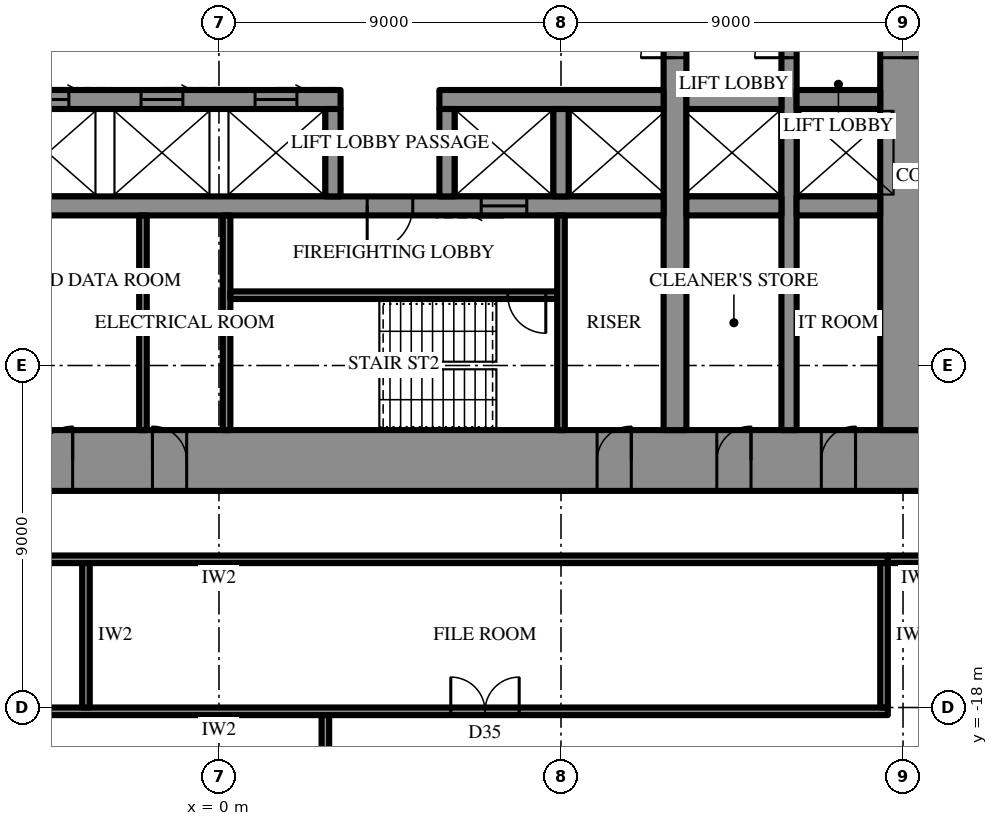
"""IFC4 building model, lengths in metres.
Left out: names, types, materials, properties, quantities, classifications, styles, units other than length and angle.
Written with IfcOpenShell. Run it as: python <this file> out.ifc"""

import sys

from ifc_helpers import new_model, si_unit, direction, frame, frame_2d, origin, place, context, subcontext, project, spatial, rectangle, extrude, element, fill, save


model = new_model("IFC4")
c1 = context("Model", 3, precision=1e-05, world=origin(), true_north=direction((0.0, 1.0)))
c2 = subcontext(c1, "Body", "Model", "MODEL_VIEW")
j1 = project(units=[si_unit("LENGTHUNIT", "METRE"), si_unit("PLANEANGLEUNIT", "RADIAN")], contexts=[c1])
p1 = place(None, origin())
s1 = spatial("IfcSite", under=j1, at=p1, CompositionType="ELEMENT")
p2 = place(p1, origin())
s2 = spatial("IfcBuilding", under=s1, at=p2, CompositionType="ELEMENT")
p3 = place(p2, frame((0.0, 0.0, 82.3)))
s3 = spatial("IfcBuildingStorey", under=s2, at=p3, CompositionType="ELEMENT", Elevation=82.3)
p4 = place(p3, frame((18.6, -11.5, 0.0), z_axis=(0.0, 0.0, 1.0), x_axis=(-1.0, 0.0, 0.0)))
e1 = element("IfcWall", 1, at=p4, inside=s3, PredefinedType="SHEAR", context=c2, shape_type="SweptSolid", body=[
    extrude(rectangle(XDim=37.2, YDim=1.6, at=frame_2d((18.6, 0.0))), origin(), (0.0, 0.0, 1.0), 4.2),
])
p5 = place(p4, frame((19.45, 0.0, 0.0)))
e2 = element("IfcOpeningElement", 2, at=p5, cuts=e1, PredefinedType="OPENING", context=c2, shape_type="SweptSolid", body=[
    extrude(rectangle(XDim=0.9, YDim=2.2, at=frame_2d((0.45, 1.1))), frame((0.0, 0.81, 0.0), z_axis=(0.0, -1.0, 0.0), x_axis=(1.0, 0.0, 0.0)), (0.0, 0.0, 1.0), 1.62),
])
p6 = place(p4, frame((22.45, 0.0, 0.0)))
e3 = element("IfcOpeningElement", 3, at=p6, cuts=e1, PredefinedType="OPENING", context=c2, shape_type="SweptSolid", body=[
    extrude(rectangle(XDim=0.9, YDim=2.2, at=frame_2d((0.45, 1.1))), frame((0.0, 0.81, 0.0), z_axis=(0.0, -1.0, 0.0), x_axis=(1.0, 0.0, 0.0)), (0.0, 0.0, 1.0), 1.62),
])
p7 = place(p4, frame((25.5, 0.0, 0.0)))
e4 = element("IfcOpeningElement", 4, at=p7, cuts=e1, PredefinedType="OPENING", context=c2, shape_type="SweptSolid", body=[
    extrude(rectangle(XDim=1.0, YDim=2.2, at=frame_2d((0.5, 1.1))), frame((0.0, 0.81, 0.0), z_axis=(0.0, -1.0, 0.0), x_axis=(1.0, 0.0, 0.0)), (0.0, 0.0, 1.0), 1.62),
])
p8 = place(p4, frame((1.85, 0.0, 0.0)))
e5 = element("IfcOpeningElement", 5, at=p8, cuts=e1, PredefinedType="OPENING", context=c2, shape_type="SweptSolid", body=[
    extrude(rectangle(XDim=0.9, YDim=2.2, at=frame_2d((0.45, 1.1))), frame((0.0, 0.81, 0.0), z_axis=(0.0, -1.0, 0.0), x_axis=(1.0, 0.0, 0.0)), (0.0, 0.0, 1.0), 1.62),
])
p9 = place(p4, frame((4.6, 0.0, 0.0)))
e6 = element("IfcOpeningElement", 6, at=p9, cuts=e1, PredefinedType="OPENING", context=c2, shape_type="SweptSolid", body=[
    extrude(rectangle(XDim=0.9, YDim=2.2, at=frame_2d((0.45, 1.1))), frame((0.0, 0.81, 0.0), z_axis=(0.0, -1.0, 0.0), x_axis=(1.0, 0.0, 0.0)), (0.0, 0.0, 1.0), 1.62),
])
p10 = place(p4, frame((7.75, 0.0, 0.0)))
e7 = element("IfcOpeningElement", 7, at=p10, cuts=e1, PredefinedType="OPENING", context=c2, shape_type="SweptSolid", body=[
    extrude(rectangle(XDim=0.9, YDim=2.2, at=frame_2d((0.45, 1.1))), frame((0.0, 0.81, 0.0), z_axis=(0.0, -1.0, 0.0), x_axis=(1.0, 0.0, 0.0)), (0.0, 0.0, 1.0), 1.62),
])
p11 = place(p4, frame((28.55, 0.0, 0.0)))
e8 = element("IfcOpeningElement", 8, at=p11, cuts=e1, PredefinedType="OPENING", context=c2, shape_type="SweptSolid", body=[
    extrude(rectangle(XDim=0.9, YDim=2.2, at=frame_2d((0.45, 1.1))), frame((0.0, 0.81, 0.0), z_axis=(0.0, -1.0, 0.0), x_axis=(1.0, 0.0, 0.0)), (0.0, 0.0, 1.0), 1.62),
])
p12 = place(p4, frame((31.7, 0.0, 0.0)))
e9 = element("IfcOpeningElement", 9, at=p12, cuts=e1, PredefinedType="OPENING", context=c2, shape_type="SweptSolid", body=[
    extrude(rectangle(XDim=0.9, YDim=2.2, at=frame_2d((0.45, 1.1))), frame((0.0, 0.81, 0.0), z_axis=(0.0, -1.0, 0.0), x_axis=(1.0, 0.0, 0.0)), (0.0, 0.0, 1.0), 1.62),
])
p13 = place(p4, frame((34.45, 0.0, 0.0)))
e10 = element("IfcOpeningElement", 10, at=p13, cuts=e1, PredefinedType="OPENING", context=c2, shape_type="SweptSolid", body=[
    extrude(rectangle(XDim=0.9, YDim=2.2, at=frame_2d((0.45, 1.1))), frame((0.0, 0.81, 0.0), z_axis=(0.0, -1.0, 0.0), x_axis=(1.0, 0.0, 0.0)), (0.0, 0.0, 1.0), 1.62),
])
p14 = place(p3, frame((18.0, -10.7, 0.0), z_axis=(0.0, 0.0, 1.0), x_axis=(0.0, 1.0, 0.0)))
e11 = element("IfcWall", 11, at=p14, inside=s3, PredefinedType="SHEAR", context=c2, shape_type="SweptSolid", body=[
    extrude(rectangle(XDim=21.4, YDim=1.2, at=frame_2d((10.7, 0.0))), origin(), (0.0, 0.0, 1.0), 4.2),
])
p15 = place(p14, frame((9.8, 0.0, 0.0)))
e12 = element("IfcOpeningElement", 12, at=p15, cuts=e11, PredefinedType="OPENING", context=c2, shape_type="SweptSolid", body=[
    extrude(rectangle(XDim=1.8, YDim=2.4, at=frame_2d((0.9, 1.2))), frame((0.0, 0.61, 0.0), z_axis=(0.0, -1.0, 0.0), x_axis=(1.0, 0.0, 0.0)), (0.0, 0.0, 1.0), 1.22),
])
p16 = place(p3, frame((12.0, -10.7, 0.0), z_axis=(0.0, 0.0, 1.0), x_axis=(0.0, 1.0, 0.0)))
e13 = element("IfcWall", 13, at=p16, inside=s3, PredefinedType="SHEAR", context=c2, shape_type="SweptSolid", body=[
    extrude(rectangle(XDim=21.4, YDim=0.6, at=frame_2d((10.7, 0.0))), origin(), (0.0, 0.0, 1.0), 4.2),
])
p17 = place(p16, frame((9.8, 0.0, 0.0)))
e14 = element("IfcOpeningElement", 14, at=p17, cuts=e13, PredefinedType="OPENING", context=c2, shape_type="SweptSolid", body=[
    extrude(rectangle(XDim=1.8, YDim=2.4, at=frame_2d((0.9, 1.2))), frame((0.0, 0.31, 0.0), z_axis=(0.0, -1.0, 0.0), x_axis=(1.0, 0.0, 0.0)), (0.0, 0.0, 1.0), 0.62),
])
p18 = place(p3, frame((15.0, -10.7, 0.0), z_axis=(0.0, 0.0, 1.0), x_axis=(0.0, 1.0, 0.0)))
e15 = element("IfcWall", 15, at=p18, inside=s3, PredefinedType="SHEAR", context=c2, shape_type="SweptSolid", body=[
    extrude(rectangle(XDim=21.4, YDim=0.4, at=frame_2d((10.7, 0.0))), origin(), (0.0, 0.0, 1.0), 4.2),
])
p19 = place(p18, frame((9.8, 0.0, 0.0)))
e16 = element("IfcOpeningElement", 16, at=p19, cuts=e15, PredefinedType="OPENING", context=c2, shape_type="SweptSolid", body=[
    extrude(rectangle(XDim=1.8, YDim=2.4, at=frame_2d((0.9, 1.2))), frame((0.0, 0.21, 0.0), z_axis=(0.0, -1.0, 0.0), x_axis=(1.0, 0.0, 0.0)), (0.0, 0.0, 1.0), 0.42),
])
p20 = place(p3, frame((17.4, -2.0, 0.0), z_axis=(0.0, 0.0, 1.0), x_axis=(-1.0, 0.0, 0.0)))
e17 = element("IfcWall", 17, at=p20, inside=s3, PredefinedType="SHEAR", context=c2, shape_type="SweptSolid", body=[
    extrude(rectangle(XDim=2.2, YDim=0.5, at=frame_2d((1.1, 0.0))), origin(), (0.0, 0.0, 1.0), 4.2),
])
p21 = place(p3, frame((14.8, -2.0, 0.0), z_axis=(0.0, 0.0, 1.0), x_axis=(-1.0, 0.0, 0.0)))
e18 = element("IfcWall", 18, at=p21, inside=s3, PredefinedType="SHEAR", context=c2, shape_type="SweptSolid", body=[
    extrude(rectangle(XDim=2.5, YDim=0.5, at=frame_2d((1.25, 0.0))), origin(), (0.0, 0.0, 1.0), 4.2),
])
p22 = place(p3, frame((11.7, -2.0, 0.0), z_axis=(0.0, 0.0, 1.0), x_axis=(-1.0, 0.0, 0.0)))
e19 = element("IfcWall", 19, at=p22, inside=s3, PredefinedType="SHEAR", context=c2, shape_type="SweptSolid", body=[
    extrude(rectangle(XDim=5.9, YDim=0.5, at=frame_2d((2.95, 0.0))), origin(), (0.0, 0.0, 1.0), 4.2),
])
p23 = place(p3, frame((3.2, -2.0, 0.0), z_axis=(0.0, 0.0, 1.0), x_axis=(-1.0, 0.0, 0.0)))
e20 = element("IfcWall", 20, at=p23, inside=s3, PredefinedType="SHEAR", context=c2, shape_type="SweptSolid", body=[
    extrude(rectangle(XDim=14.9, YDim=0.5, at=frame_2d((7.45, 0.0))), origin(), (0.0, 0.0, 1.0), 4.2),
])
p24 = place(p23, frame((1.15, 0.0, 0.0)))
e21 = element("IfcOpeningElement", 21, at=p24, cuts=e20, PredefinedType="OPENING", context=c2, shape_type="SweptSolid", body=[
    extrude(rectangle(XDim=1.1, YDim=2.2, at=frame_2d((0.55, 1.1))), frame((0.0, 0.26, 0.0), z_axis=(0.0, -1.0, 0.0), x_axis=(1.0, 0.0, 0.0)), (0.0, 0.0, 1.0), 0.52),
])
p25 = place(p23, frame((4.15, 0.0, 0.0)))
e22 = element("IfcOpeningElement", 22, at=p25, cuts=e20, PredefinedType="OPENING", context=c2, shape_type="SweptSolid", body=[
    extrude(rectangle(XDim=1.1, YDim=2.2, at=frame_2d((0.55, 1.1))), frame((0.0, 0.26, 0.0), z_axis=(0.0, -1.0, 0.0), x_axis=(1.0, 0.0, 0.0)), (0.0, 0.0, 1.0), 0.52),
])
p26 = place(p23, frame((7.15, 0.0, 0.0)))
e23 = element("IfcOpeningElement", 23, at=p26, cuts=e20, PredefinedType="OPENING", context=c2, shape_type="SweptSolid", body=[
    extrude(rectangle(XDim=1.1, YDim=2.2, at=frame_2d((0.55, 1.1))), frame((0.0, 0.26, 0.0), z_axis=(0.0, -1.0, 0.0), x_axis=(1.0, 0.0, 0.0)), (0.0, 0.0, 1.0), 0.52),
])
p27 = place(p23, frame((10.15, 0.0, 0.0)))
e24 = element("IfcOpeningElement", 24, at=p27, cuts=e20, PredefinedType="OPENING", context=c2, shape_type="SweptSolid", body=[
    extrude(rectangle(XDim=1.1, YDim=2.2, at=frame_2d((0.55, 1.1))), frame((0.0, 0.26, 0.0), z_axis=(0.0, -1.0, 0.0), x_axis=(1.0, 0.0, 0.0)), (0.0, 0.0, 1.0), 0.52),
])
p28 = place(p3, frame((17.4, -4.8, 0.0), z_axis=(0.0, 0.0, 1.0), x_axis=(-1.0, 0.0, 0.0)))
e25 = element("IfcWall", 25, at=p28, inside=s3, PredefinedType="SHEAR", context=c2, shape_type="SweptSolid", body=[
    extrude(rectangle(XDim=2.2, YDim=0.5, at=frame_2d((1.1, 0.0))), origin(), (0.0, 0.0, 1.0), 4.2),
])
p29 = place(p3, frame((14.8, -4.8, 0.0), z_axis=(0.0, 0.0, 1.0), x_axis=(-1.0, 0.0, 0.0)))
e26 = element("IfcWall", 26, at=p29, inside=s3, PredefinedType="SHEAR", context=c2, shape_type="SweptSolid", body=[
    extrude(rectangle(XDim=2.5, YDim=0.5, at=frame_2d((1.25, 0.0))), origin(), (0.0, 0.0, 1.0), 4.2),
])
p30 = place(p3, frame((11.7, -4.8, 0.0), z_axis=(0.0, 0.0, 1.0), x_axis=(-1.0, 0.0, 0.0)))
e27 = element("IfcWall", 27, at=p30, inside=s3, PredefinedType="SHEAR", context=c2, shape_type="SweptSolid", body=[
    extrude(rectangle(XDim=23.4, YDim=0.5, at=frame_2d((11.7, 0.0))), origin(), (0.0, 0.0, 1.0), 4.2),
])
p31 = place(p30, frame((6.6, 0.0, 0.0)))
e28 = element("IfcOpeningElement", 28, at=p31, cuts=e27, PredefinedType="OPENING", context=c2, shape_type="SweptSolid", body=[
    extrude(rectangle(XDim=1.2, YDim=2.2, at=frame_2d((0.6, 1.1))), frame((0.0, 0.26, 0.0), z_axis=(0.0, -1.0, 0.0), x_axis=(1.0, 0.0, 0.0)), (0.0, 0.0, 1.0), 0.52),
])
p32 = place(p30, frame((3.6, 0.0, 0.0)))
e29 = element("IfcOpeningElement", 29, at=p32, cuts=e27, PredefinedType="OPENING", context=c2, shape_type="SweptSolid", body=[
    extrude(rectangle(XDim=1.2, YDim=2.2, at=frame_2d((0.6, 1.1))), frame((0.0, 0.26, 0.0), z_axis=(0.0, -1.0, 0.0), x_axis=(1.0, 0.0, 0.0)), (0.0, 0.0, 1.0), 0.52),
])
for number, where, z_axis, x_axis in (
    (30, (9.0, -2.25, 0.0), (0.0, 0.0, 1.0), (0.0, -1.0, 0.0)),
    (31, (6.0, -2.25, 0.0), (0.0, 0.0, 1.0), (0.0, -1.0, 0.0)),
    (32, (3.0, -2.25, 0.0), (0.0, 0.0, 1.0), (0.0, -1.0, 0.0)),
):
    element("IfcWall", number, at=place(p3, frame(where, z_axis=z_axis, x_axis=x_axis)), inside=s3, PredefinedType="SHEAR", context=c2, shape_type="SweptSolid", body=[
        extrude(rectangle(XDim=2.3, YDim=0.4, at=frame_2d((1.15, 0.0))), origin(), (0.0, 0.0, 1.0), 4.2),
    ])
p33 = place(p3, frame((0.2, -5.05, 0.0), z_axis=(0.0, 0.0, 1.0), x_axis=(0.0, -1.0, 0.0)))
e33 = element("IfcWall", 33, at=p33, inside=s3, PredefinedType="SHEAR", context=c2, shape_type="SweptSolid", body=[
    extrude(rectangle(XDim=5.65, YDim=0.2, at=frame_2d((2.825, 0.0))), origin(), (0.0, 0.0, 1.0), 4.2),
])
p34 = place(p3, frame((8.9, -7.15, 0.0), z_axis=(0.0, 0.0, 1.0), x_axis=(-1.0, 0.0, 0.0)))
e34 = element("IfcWall", 34, at=p34, inside=s3, PredefinedType="SHEAR", context=c2, shape_type="SweptSolid", body=[
    extrude(rectangle(XDim=8.6, YDim=0.2, at=frame_2d((4.3, 0.0))), origin(), (0.0, 0.0, 1.0), 4.2),
])
p35 = place(p34, frame((0.3, 0.0, 0.0)))
e35 = element("IfcOpeningElement", 35, at=p35, cuts=e34, PredefinedType="OPENING", context=c2, shape_type="SweptSolid", body=[
    extrude(rectangle(XDim=1.0, YDim=2.2, at=frame_2d((0.5, 1.1))), frame((0.0, 0.11, 0.0), z_axis=(0.0, -1.0, 0.0), x_axis=(1.0, 0.0, 0.0)), (0.0, 0.0, 1.0), 0.22),
])
for number, where, z_axis, x_axis in (
    (36, (9.0, -5.05, 0.0), (0.0, 0.0, 1.0), (0.0, -1.0, 0.0)),
    (37, (-2.0, -5.05, 0.0), (0.0, 0.0, 1.0), (0.0, -1.0, 0.0)),
):
    element("IfcWall", number, at=place(p3, frame(where, z_axis=z_axis, x_axis=x_axis)), inside=s3, PredefinedType="PARTITIONING", context=c2, shape_type="SweptSolid", body=[
        extrude(rectangle(XDim=5.65, YDim=0.2, at=frame_2d((2.825, 0.0))), origin(), (0.0, 0.0, 1.0), 4.0),
    ])
p36 = place(p3, frame((17.6, -14.1, 0.0), z_axis=(0.0, 0.0, 1.0), x_axis=(-1.0, 0.0, 0.0)))
e38 = element("IfcWall", 38, at=p36, inside=s3, PredefinedType="PARTITIONING", context=c2, shape_type="SweptSolid", body=[
    extrude(rectangle(XDim=35.2, YDim=0.2, at=frame_2d((17.6, 0.0))), origin(), (0.0, 0.0, 1.0), 4.0),
])
p37 = place(p3, frame((17.6, -18.1, 0.0), z_axis=(0.0, 0.0, 1.0), x_axis=(-1.0, 0.0, 0.0)))
e39 = element("IfcWall", 39, at=p37, inside=s3, PredefinedType="PARTITIONING", context=c2, shape_type="SweptSolid", body=[
    extrude(rectangle(XDim=35.2, YDim=0.2, at=frame_2d((17.6, 0.0))), origin(), (0.0, 0.0, 1.0), 4.0),
])
p38 = place(p37, frame((9.7, 0.0, 0.0)))
e40 = element("IfcOpeningElement", 40, at=p38, cuts=e39, PredefinedType="OPENING", context=c2, shape_type="SweptSolid", body=[
    extrude(rectangle(XDim=1.8, YDim=2.4, at=frame_2d((0.9, 1.2))), frame((0.0, 0.11, 0.0), z_axis=(0.0, -1.0, 0.0), x_axis=(1.0, 0.0, 0.0)), (0.0, 0.0, 1.0), 0.22),
])
p39 = place(p37, frame((27.2, 0.0, 0.0)))
e41 = element("IfcOpeningElement", 41, at=p39, cuts=e39, PredefinedType="OPENING", context=c2, shape_type="SweptSolid", body=[
    extrude(rectangle(XDim=1.8, YDim=2.4, at=frame_2d((0.9, 1.2))), frame((0.0, 0.11, 0.0), z_axis=(0.0, -1.0, 0.0), x_axis=(1.0, 0.0, 0.0)), (0.0, 0.0, 1.0), 0.22),
])
for number, where, z_axis, x_axis in (
    (42, (17.5, -14.2, 0.0), (0.0, 0.0, 1.0), (0.0, -1.0, 0.0)),
    (43, (-3.5, -14.2, 0.0), (0.0, 0.0, 1.0), (0.0, -1.0, 0.0)),
):
    element("IfcWall", number, at=place(p3, frame(where, z_axis=z_axis, x_axis=x_axis)), inside=s3, PredefinedType="PARTITIONING", context=c2, shape_type="SweptSolid", body=[
        extrude(rectangle(XDim=3.8, YDim=0.2, at=frame_2d((1.9, 0.0))), origin(), (0.0, 0.0, 1.0), 4.0),
    ])
p40 = place(p3, frame((19.2, -14.1, 0.0), z_axis=(0.0, 0.0, 1.0), x_axis=(-1.0, 0.0, 0.0)))
e44 = element("IfcWall", 44, at=p40, inside=s3, PredefinedType="PARTITIONING", context=c2, shape_type="SweptSolid", body=[
    extrude(rectangle(XDim=1.6, YDim=0.2, at=frame_2d((0.8, 0.0))), origin(), (0.0, 0.0, 1.0), 4.0),
])
p41 = place(p3, frame((2.8, -18.2, 0.0), z_axis=(0.0, 0.0, 1.0), x_axis=(0.0, -1.0, 0.0)))
e45 = element("IfcWall", 45, at=p41, inside=s3, PredefinedType="PARTITIONING", context=c2, shape_type="SweptSolid", body=[
    extrude(rectangle(XDim=15.6, YDim=0.2, at=frame_2d((7.8, 0.0))), origin(), (0.0, 0.0, 1.0), 2.944),
])
p42 = place(p41, frame((1.06, 0.0, 0.0)))
e46 = element("IfcOpeningElement", 46, at=p42, cuts=e45, PredefinedType="OPENING", context=c2, shape_type="SweptSolid", body=[
    extrude(rectangle(XDim=1.0, YDim=2.2, at=frame_2d((0.5, 1.1))), frame((0.0, 0.11, 0.0), z_axis=(0.0, -1.0, 0.0), x_axis=(1.0, 0.0, 0.0)), (0.0, 0.0, 1.0), 0.22),
])
p43 = place(p15, frame((1.8, 0.0, 0.0), z_axis=(0.0, 0.0, 1.0), x_axis=(-1.0, 0.0, 0.0)))
e47 = element("IfcDoor", 47, at=p43, inside=s3, OperationType="DOUBLE_DOOR_SINGLE_SWING", PredefinedType="DOOR", context=c2, shape_type="SweptSolid", body=[
    extrude(rectangle(XDim=1.8, YDim=2.4, at=frame_2d((0.9, 1.2))), frame((0.0, 0.025, 0.0), z_axis=(0.0, -1.0, 0.0), x_axis=(1.0, 0.0, 0.0)), (0.0, 0.0, 1.0), 0.05),
])
fill(e12, e47)
p44 = place(p31, origin())
e48 = element("IfcDoor", 48, at=p44, inside=s3, OperationType="SINGLE_SWING_LEFT", PredefinedType="DOOR", context=c2, shape_type="SweptSolid", body=[
    extrude(rectangle(XDim=1.2, YDim=2.2, at=frame_2d((0.6, 1.1))), frame((0.0, 0.025, 0.0), z_axis=(0.0, -1.0, 0.0), x_axis=(1.0, 0.0, 0.0)), (0.0, 0.0, 1.0), 0.05),
])
fill(e28, e48)
p45 = place(p35, origin())
e49 = element("IfcDoor", 49, at=p45, inside=s3, OperationType="SINGLE_SWING_RIGHT", PredefinedType="DOOR", context=c2, shape_type="SweptSolid", body=[
    extrude(rectangle(XDim=1.0, YDim=2.2, at=frame_2d((0.5, 1.1))), frame((0.0, 0.025, 0.0), z_axis=(0.0, -1.0, 0.0), x_axis=(1.0, 0.0, 0.0)), (0.0, 0.0, 1.0), 0.05),
])
fill(e35, e49)
p46 = place(p5, frame((0.9, 0.0, 0.0), z_axis=(0.0, 0.0, 1.0), x_axis=(-1.0, 0.0, 0.0)))
e50 = element("IfcDoor", 50, at=p46, inside=s3, OperationType="SINGLE_SWING_RIGHT", PredefinedType="DOOR", context=c2, shape_type="SweptSolid", body=[
    extrude(rectangle(XDim=0.9, YDim=2.2, at=frame_2d((0.45, 1.1))), frame((0.0, 0.025, 0.0), z_axis=(0.0, -1.0, 0.0), x_axis=(1.0, 0.0, 0.0)), (0.0, 0.0, 1.0), 0.05),
])
fill(e2, e50)
p47 = place(p6, frame((0.9, 0.0, 0.0), z_axis=(0.0, 0.0, 1.0), x_axis=(-1.0, 0.0, 0.0)))
e51 = element("IfcDoor", 51, at=p47, inside=s3, OperationType="SINGLE_SWING_LEFT", PredefinedType="DOOR", context=c2, shape_type="SweptSolid", body=[
    extrude(rectangle(XDim=0.9, YDim=2.2, at=frame_2d((0.45, 1.1))), frame((0.0, 0.025, 0.0), z_axis=(0.0, -1.0, 0.0), x_axis=(1.0, 0.0, 0.0)), (0.0, 0.0, 1.0), 0.05),
])
fill(e3, e51)
p48 = place(p8, frame((0.9, 0.0, 0.0), z_axis=(0.0, 0.0, 1.0), x_axis=(-1.0, 0.0, 0.0)))
e52 = element("IfcDoor", 52, at=p48, inside=s3, OperationType="SINGLE_SWING_LEFT", PredefinedType="DOOR", context=c2, shape_type="SweptSolid", body=[
    extrude(rectangle(XDim=0.9, YDim=2.2, at=frame_2d((0.45, 1.1))), frame((0.0, 0.025, 0.0), z_axis=(0.0, -1.0, 0.0), x_axis=(1.0, 0.0, 0.0)), (0.0, 0.0, 1.0), 0.05),
])
fill(e5, e52)
p49 = place(p9, frame((0.9, 0.0, 0.0), z_axis=(0.0, 0.0, 1.0), x_axis=(-1.0, 0.0, 0.0)))
e53 = element("IfcDoor", 53, at=p49, inside=s3, OperationType="SINGLE_SWING_LEFT", PredefinedType="DOOR", context=c2, shape_type="SweptSolid", body=[
    extrude(rectangle(XDim=0.9, YDim=2.2, at=frame_2d((0.45, 1.1))), frame((0.0, 0.025, 0.0), z_axis=(0.0, -1.0, 0.0), x_axis=(1.0, 0.0, 0.0)), (0.0, 0.0, 1.0), 0.05),
])
fill(e6, e53)
p50 = place(p10, frame((0.9, 0.0, 0.0), z_axis=(0.0, 0.0, 1.0), x_axis=(-1.0, 0.0, 0.0)))
e54 = element("IfcDoor", 54, at=p50, inside=s3, OperationType="SINGLE_SWING_LEFT", PredefinedType="DOOR", context=c2, shape_type="SweptSolid", body=[
    extrude(rectangle(XDim=0.9, YDim=2.2, at=frame_2d((0.45, 1.1))), frame((0.0, 0.025, 0.0), z_axis=(0.0, -1.0, 0.0), x_axis=(1.0, 0.0, 0.0)), (0.0, 0.0, 1.0), 0.05),
])
fill(e7, e54)
p51 = place(p17, origin())
e55 = element("IfcDoor", 55, at=p51, inside=s3, OperationType="DOUBLE_DOOR_SINGLE_SWING", PredefinedType="DOOR", context=c2, shape_type="SweptSolid", body=[
    extrude(rectangle(XDim=1.8, YDim=2.4, at=frame_2d((0.9, 1.2))), frame((0.0, 0.025, 0.0), z_axis=(0.0, -1.0, 0.0), x_axis=(1.0, 0.0, 0.0)), (0.0, 0.0, 1.0), 0.05),
])
fill(e14, e55)
p52 = place(p19, origin())
e56 = element("IfcDoor", 56, at=p52, inside=s3, OperationType="DOUBLE_DOOR_SINGLE_SWING", PredefinedType="DOOR", context=c2, shape_type="SweptSolid", body=[
    extrude(rectangle(XDim=1.8, YDim=2.4, at=frame_2d((0.9, 1.2))), frame((0.0, 0.025, 0.0), z_axis=(0.0, -1.0, 0.0), x_axis=(1.0, 0.0, 0.0)), (0.0, 0.0, 1.0), 0.05),
])
fill(e16, e56)
p53 = place(p32, origin())
e57 = element("IfcDoor", 57, at=p53, inside=s3, OperationType="SLIDING_TO_LEFT", PredefinedType="DOOR", context=c2, shape_type="SweptSolid", body=[
    extrude(rectangle(XDim=1.2, YDim=2.2, at=frame_2d((0.6, 1.1))), frame((0.0, 0.025, 0.0), z_axis=(0.0, -1.0, 0.0), x_axis=(1.0, 0.0, 0.0)), (0.0, 0.0, 1.0), 0.05),
])
fill(e29, e57)
p54 = place(p24, frame((1.1, 0.0, 0.0), z_axis=(0.0, 0.0, 1.0), x_axis=(-1.0, 0.0, 0.0)))
e58 = element("IfcDoor", 58, at=p54, inside=s3, OperationType="SLIDING_TO_LEFT", PredefinedType="DOOR", context=c2, shape_type="SweptSolid", body=[
    extrude(rectangle(XDim=1.1, YDim=2.2, at=frame_2d((0.55, 1.1))), frame((0.0, 0.025, 0.0), z_axis=(0.0, -1.0, 0.0), x_axis=(1.0, 0.0, 0.0)), (0.0, 0.0, 1.0), 0.05),
])
fill(e21, e58)
p55 = place(p25, frame((1.1, 0.0, 0.0), z_axis=(0.0, 0.0, 1.0), x_axis=(-1.0, 0.0, 0.0)))
e59 = element("IfcDoor", 59, at=p55, inside=s3, OperationType="SLIDING_TO_LEFT", PredefinedType="DOOR", context=c2, shape_type="SweptSolid", body=[
    extrude(rectangle(XDim=1.1, YDim=2.2, at=frame_2d((0.55, 1.1))), frame((0.0, 0.025, 0.0), z_axis=(0.0, -1.0, 0.0), x_axis=(1.0, 0.0, 0.0)), (0.0, 0.0, 1.0), 0.05),
])
fill(e22, e59)
p56 = place(p26, frame((1.1, 0.0, 0.0), z_axis=(0.0, 0.0, 1.0), x_axis=(-1.0, 0.0, 0.0)))
e60 = element("IfcDoor", 60, at=p56, inside=s3, OperationType="SLIDING_TO_LEFT", PredefinedType="DOOR", context=c2, shape_type="SweptSolid", body=[
    extrude(rectangle(XDim=1.1, YDim=2.2, at=frame_2d((0.55, 1.1))), frame((0.0, 0.025, 0.0), z_axis=(0.0, -1.0, 0.0), x_axis=(1.0, 0.0, 0.0)), (0.0, 0.0, 1.0), 0.05),
])
fill(e23, e60)
p57 = place(p38, frame((1.8, 0.0, 0.0), z_axis=(0.0, 0.0, 1.0), x_axis=(-1.0, 0.0, 0.0)))
e61 = element("IfcDoor", 61, at=p57, inside=s3, OperationType="DOUBLE_DOOR_SINGLE_SWING", PredefinedType="DOOR", context=c2, shape_type="SweptSolid", body=[
    extrude(rectangle(XDim=1.8, YDim=2.4, at=frame_2d((0.9, 1.2))), frame((0.0, 0.025, 0.0), z_axis=(0.0, -1.0, 0.0), x_axis=(1.0, 0.0, 0.0)), (0.0, 0.0, 1.0), 0.05),
])
fill(e40, e61)
save(model, sys.argv[1])
